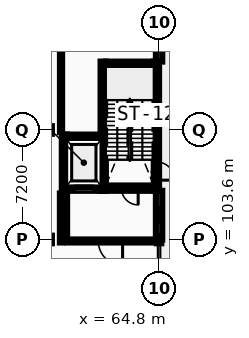
"""IFC4 building model, lengths in metres.
Left out: names, types, materials, properties, quantities, classifications, styles, units other than length and angle.
Written with IfcOpenShell. Run it as: python <this file> out.ifc"""

import sys

from ifc_helpers import new_model, si_unit, direction, frame, frame_2d, origin, origin_2d, place, context, subcontext, project, spatial, rectangle, i_section, extrude, element, fill, save


model = new_model("IFC4")
c1 = context("Model", 3, precision=1e-05, world=origin(), true_north=direction((0.0, 1.0)))
c2 = subcontext(c1, "Body", "Model", "MODEL_VIEW")
j1 = project(units=[si_unit("LENGTHUNIT", "METRE"), si_unit("PLANEANGLEUNIT", "RADIAN")], contexts=[c1])
p1 = place(None, origin())
s1 = spatial("IfcSite", under=j1, at=p1, CompositionType="ELEMENT")
p2 = place(p1, origin())
s2 = spatial("IfcBuilding", under=s1, at=p2, CompositionType="ELEMENT")
p3 = place(p2, origin())
s3 = spatial("IfcBuildingStorey", under=s2, at=p3, CompositionType="ELEMENT", Elevation=0.0)
for number, where, z_axis, x_axis in (
    (1, (57.6, 103.6, 0.0), (0.0, 0.0, 1.0), (1.0, 0.0, 0.0)),
    (2, (57.6, 110.8, 0.0), (0.0, 0.0, 1.0), (1.0, 0.0, 0.0)),
    (3, (64.8, 103.6, 0.0), (0.0, 0.0, 1.0), (1.0, 0.0, 0.0)),
):
    element("IfcColumn", number, at=place(p3, frame(where, z_axis=z_axis, x_axis=x_axis)), inside=s3, PredefinedType="COLUMN", context=c2, shape_type="SweptSolid", body=[
        extrude(i_section(OverallWidth=0.3, OverallDepth=0.5, WebThickness=0.014, FlangeThickness=0.028, FilletRadius=0.027, at=origin_2d()), origin(), (0.0, 0.0, 1.0), 5.2),
    ])
p4 = place(p3, frame((64.8, 103.6, 0.0), z_axis=(0.0, 0.0, 1.0), x_axis=(0.0, 1.0, 0.0)))
e4 = element("IfcWall", 4, at=p4, inside=s3, PredefinedType="STANDARD", context=c2, shape_type="SweptSolid", body=[
    extrude(rectangle(XDim=3.2, YDim=0.42, at=frame_2d((1.6, 0.0))), origin(), (0.0, 0.0, 1.0), 4.97),
])
p5 = place(p4, frame((1.102, 0.0, 0.95)))
e5 = element("IfcOpeningElement", 5, at=p5, cuts=e4, PredefinedType="OPENING", context=c2, shape_type="SweptSolid", body=[
    extrude(rectangle(XDim=0.996, YDim=1.368, at=frame_2d((0.498, 0.684))), frame((0.0, 0.22, 0.0), z_axis=(0.0, -1.0, 0.0), x_axis=(1.0, 0.0, 0.0)), (0.0, 0.0, 1.0), 0.44),
])
p6 = place(p3, frame((64.8, 115.3, 0.0), z_axis=(0.0, 0.0, 1.0), x_axis=(0.0, 1.0, 0.0)))
e6 = element("IfcWall", 6, at=p6, inside=s3, PredefinedType="STANDARD", context=c2, shape_type="SweptSolid", body=[
    extrude(rectangle(XDim=2.49, YDim=0.42, at=frame_2d((1.245, 0.0))), origin(), (0.0, 0.0, 1.0), 4.97),
])
p7 = place(p3, frame((61.3, 106.975, 0.0), z_axis=(0.0, 0.0, 1.0), x_axis=(1.0, 0.0, 0.0)))
e7 = element("IfcWall", 7, at=p7, inside=s3, PredefinedType="SHEAR", context=c2, shape_type="SweptSolid", body=[
    extrude(rectangle(XDim=3.15, YDim=0.35, at=frame_2d((1.575, 0.0))), origin(), (0.0, 0.0, 1.0), 4.97),
])
p8 = place(p7, frame((1.025, 0.0, 0.0)))
e8 = element("IfcOpeningElement", 8, at=p8, cuts=e7, PredefinedType="OPENING", context=c2, shape_type="SweptSolid", body=[
    extrude(rectangle(XDim=1.1, YDim=2.15, at=frame_2d((0.55, 1.075))), frame((0.0, 0.185, 0.0), z_axis=(0.0, -1.0, 0.0), x_axis=(1.0, 0.0, 0.0)), (0.0, 0.0, 1.0), 0.37),
])
p9 = place(p3, frame((61.3, 115.125, 0.0), z_axis=(0.0, 0.0, 1.0), x_axis=(1.0, 0.0, 0.0)))
e9 = element("IfcWall", 9, at=p9, inside=s3, PredefinedType="SHEAR", context=c2, shape_type="SweptSolid", body=[
    extrude(rectangle(XDim=3.15, YDim=0.35, at=frame_2d((1.575, 0.0))), origin(), (0.0, 0.0, 1.0), 4.97),
])
p10 = place(p3, frame((61.125, 106.8, 0.0), z_axis=(0.0, 0.0, 1.0), x_axis=(0.0, 1.0, 0.0)))
e10 = element("IfcWall", 10, at=p10, inside=s3, PredefinedType="SHEAR", context=c2, shape_type="SweptSolid", body=[
    extrude(rectangle(XDim=8.5, YDim=0.35, at=frame_2d((4.25, 0.0))), origin(), (0.0, 0.0, 1.0), 4.97),
])
p11 = place(p3, frame((64.625, 106.8, 0.0), z_axis=(0.0, 0.0, 1.0), x_axis=(0.0, 1.0, 0.0)))
e11 = element("IfcWall", 11, at=p11, inside=s3, PredefinedType="SHEAR", context=c2, shape_type="SweptSolid", body=[
    extrude(rectangle(XDim=8.5, YDim=0.35, at=frame_2d((4.25, 0.0))), origin(), (0.0, 0.0, 1.0), 4.97),
])
p12 = place(p11, frame((0.7, 0.0, 0.0)))
e12 = element("IfcOpeningElement", 12, at=p12, cuts=e11, PredefinedType="OPENING", context=c2, shape_type="SweptSolid", body=[
    extrude(rectangle(XDim=1.2, YDim=2.15, at=frame_2d((0.6, 1.075))), frame((0.0, 0.185, 0.0), z_axis=(0.0, -1.0, 0.0), x_axis=(1.0, 0.0, 0.0)), (0.0, 0.0, 1.0), 0.37),
])
p13 = place(p3, frame((58.75, 106.975, 0.0), z_axis=(0.0, 0.0, 1.0), x_axis=(1.0, 0.0, 0.0)))
e13 = element("IfcWall", 13, at=p13, inside=s3, PredefinedType="SHEAR", context=c2, shape_type="SweptSolid", body=[
    extrude(rectangle(XDim=2.2, YDim=0.35, at=frame_2d((1.1, 0.0))), origin(), (0.0, 0.0, 1.0), 4.97),
])
p14 = place(p13, frame((0.5, 0.0, 0.0)))
e14 = element("IfcOpeningElement", 14, at=p14, cuts=e13, PredefinedType="OPENING", context=c2, shape_type="SweptSolid", body=[
    extrude(rectangle(XDim=1.2, YDim=2.2, at=frame_2d((0.6, 1.1))), frame((0.0, 0.185, 0.0), z_axis=(0.0, -1.0, 0.0), x_axis=(1.0, 0.0, 0.0)), (0.0, 0.0, 1.0), 0.37),
])
p15 = place(p3, frame((58.75, 110.325, 0.0), z_axis=(0.0, 0.0, 1.0), x_axis=(1.0, 0.0, 0.0)))
e15 = element("IfcWall", 15, at=p15, inside=s3, PredefinedType="SHEAR", context=c2, shape_type="SweptSolid", body=[
    extrude(rectangle(XDim=2.2, YDim=0.35, at=frame_2d((1.1, 0.0))), origin(), (0.0, 0.0, 1.0), 4.97),
])
p16 = place(p3, frame((58.575, 106.8, 0.0), z_axis=(0.0, 0.0, 1.0), x_axis=(0.0, 1.0, 0.0)))
e16 = element("IfcWall", 16, at=p16, inside=s3, PredefinedType="SHEAR", context=c2, shape_type="SweptSolid", body=[
    extrude(rectangle(XDim=3.7, YDim=0.35, at=frame_2d((1.85, 0.0))), origin(), (0.0, 0.0, 1.0), 4.97),
])
p17 = place(p3, frame((58.75, 103.5, 0.0), z_axis=(0.0, 0.0, 1.0), x_axis=(1.0, 0.0, 0.0)))
e17 = element("IfcWall", 17, at=p17, inside=s3, PredefinedType="PARTITIONING", context=c2, shape_type="SweptSolid", body=[
    extrude(rectangle(XDim=5.7, YDim=0.2, at=frame_2d((2.85, 0.0))), origin(), (0.0, 0.0, 1.0), 4.665),
])
p18 = place(p17, frame((2.05, 0.0, 0.0)))
e18 = element("IfcOpeningElement", 18, at=p18, cuts=e17, PredefinedType="OPENING", context=c2, shape_type="SweptSolid", body=[
    extrude(rectangle(XDim=1.6, YDim=2.2, at=frame_2d((0.8, 1.1))), frame((0.0, 0.11, 0.0), z_axis=(0.0, -1.0, 0.0), x_axis=(1.0, 0.0, 0.0)), (0.0, 0.0, 1.0), 0.22),
])
p19 = place(p3, frame((58.65, 103.6, 0.0), z_axis=(0.0, 0.0, 1.0), x_axis=(0.0, 1.0, 0.0)))
e19 = element("IfcWall", 19, at=p19, inside=s3, PredefinedType="PARTITIONING", context=c2, shape_type="SweptSolid", body=[
    extrude(rectangle(XDim=3.2, YDim=0.2, at=frame_2d((1.6, 0.0))), origin(), (0.0, 0.0, 1.0), 4.97),
])
p20 = place(p3, frame((58.35, 103.4, 0.0), z_axis=(0.0, 0.0, 1.0), x_axis=(0.0, 1.0, 0.0)))
e20 = element("IfcWall", 20, at=p20, inside=s3, PredefinedType="PARTITIONING", context=c2, shape_type="SweptSolid", body=[
    extrude(rectangle(XDim=3.225, YDim=0.15, at=frame_2d((1.613, 0.0))), origin(), (0.0, 0.0, 1.0), 4.97),
])
p21 = place(p3, frame((58.35, 110.675, 0.0), z_axis=(0.0, 0.0, 1.0), x_axis=(0.0, 1.0, 0.0)))
e21 = element("IfcWall", 21, at=p21, inside=s3, PredefinedType="PARTITIONING", context=c2, shape_type="SweptSolid", body=[
    extrude(rectangle(XDim=7.125, YDim=0.142, at=frame_2d((3.562, 0.0))), origin(), (0.0, 0.0, 1.0), 4.97),
])
p22 = place(p5, origin())
e22 = element("IfcWindow", 22, at=p22, inside=s3, PartitioningType="SINGLE_PANEL", PredefinedType="WINDOW", context=c2, shape_type="SweptSolid", body=[
    extrude(rectangle(XDim=0.996, YDim=1.368, at=frame_2d((0.498, 0.684))), frame((0.0, 0.03, 0.0), z_axis=(0.0, -1.0, 0.0), x_axis=(1.0, 0.0, 0.0)), (0.0, 0.0, 1.0), 0.06),
])
fill(e5, e22)
p23 = place(p8, origin())
e23 = element("IfcDoor", 23, at=p23, inside=s3, OperationType="SINGLE_SWING_RIGHT", PredefinedType="DOOR", context=c2, shape_type="SweptSolid", body=[
    extrude(rectangle(XDim=1.1, YDim=2.15, at=frame_2d((0.55, 1.075))), frame((0.0, 0.025, 0.0), z_axis=(0.0, -1.0, 0.0), x_axis=(1.0, 0.0, 0.0)), (0.0, 0.0, 1.0), 0.05),
])
fill(e8, e23)
p24 = place(p12, frame((1.2, 0.0, 0.0), z_axis=(0.0, 0.0, 1.0), x_axis=(-1.0, 0.0, 0.0)))
e24 = element("IfcDoor", 24, at=p24, inside=s3, OperationType="SINGLE_SWING_LEFT", PredefinedType="DOOR", context=c2, shape_type="SweptSolid", body=[
    extrude(rectangle(XDim=1.2, YDim=2.15, at=frame_2d((0.6, 1.075))), frame((0.0, 0.025, 0.0), z_axis=(0.0, -1.0, 0.0), x_axis=(1.0, 0.0, 0.0)), (0.0, 0.0, 1.0), 0.05),
])
fill(e12, e24)
p25 = place(p14, origin())
e25 = element("IfcDoor", 25, at=p25, inside=s3, OperationType="SLIDING_TO_RIGHT", PredefinedType="DOOR", context=c2, shape_type="SweptSolid", body=[
    extrude(rectangle(XDim=1.2, YDim=2.2, at=frame_2d((0.6, 1.1))), frame((0.0, 0.025, 0.0), z_axis=(0.0, -1.0, 0.0), x_axis=(1.0, 0.0, 0.0)), (0.0, 0.0, 1.0), 0.05),
])
fill(e14, e25)
p26 = place(p18, origin())
e26 = element("IfcDoor", 26, at=p26, inside=s3, OperationType="DOUBLE_DOOR_SINGLE_SWING", PredefinedType="DOOR", context=c2, shape_type="SweptSolid", body=[
    extrude(rectangle(XDim=1.6, YDim=2.2, at=frame_2d((0.8, 1.1))), frame((0.0, 0.025, 0.0), z_axis=(0.0, -1.0, 0.0), x_axis=(1.0, 0.0, 0.0)), (0.0, 0.0, 1.0), 0.05),
])
fill(e18, e26)
save(model, sys.argv[1])
